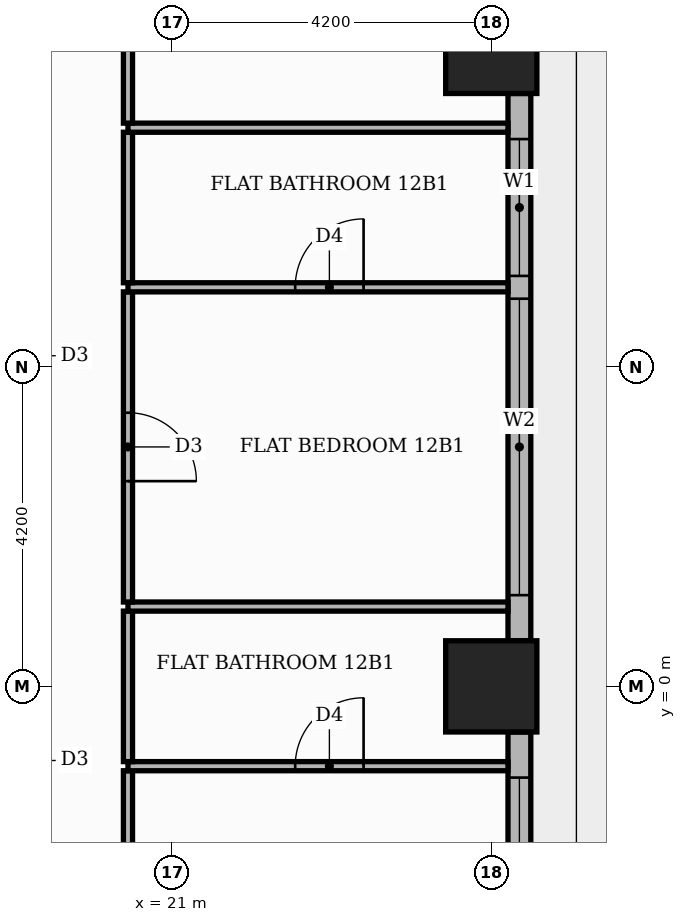
"""IFC4 building model, lengths in metres.
Left out: names, types, materials, properties, quantities, classifications, styles, units other than length and angle.
Written with IfcOpenShell. Run it as: python <this file> out.ifc"""

import sys

from ifc_helpers import new_model, si_unit, direction, frame, frame_2d, origin, origin_2d, place, context, subcontext, project, spatial, rectangle, extrude, element, fill, save


model = new_model("IFC4")
c1 = context("Model", 3, precision=1e-05, world=origin(), true_north=direction((0.0, 1.0)))
c2 = subcontext(c1, "Body", "Model", "MODEL_VIEW")
j1 = project(units=[si_unit("LENGTHUNIT", "METRE"), si_unit("PLANEANGLEUNIT", "RADIAN")], contexts=[c1])
p1 = place(None, origin())
s1 = spatial("IfcSite", under=j1, at=p1, CompositionType="ELEMENT")
p2 = place(p1, origin())
s2 = spatial("IfcBuilding", under=s1, at=p2, CompositionType="ELEMENT")
p3 = place(p2, frame((0.0, 0.0, 54.3)))
s3 = spatial("IfcBuildingStorey", under=s2, at=p3, CompositionType="ELEMENT", Elevation=54.3)
for number, where, z_axis, x_axis in (
    (1, (25.2, 0.0, 0.0), (0.0, 0.0, 1.0), (1.0, 0.0, 0.0)),
    (2, (25.2, 8.4, 0.0), (0.0, 0.0, 1.0), (1.0, 0.0, 0.0)),
):
    element("IfcColumn", number, at=place(p3, frame(where, z_axis=z_axis, x_axis=x_axis)), inside=s3, PredefinedType="COLUMN", context=c2, shape_type="SweptSolid", body=[
        extrude(rectangle(XDim=1.2, YDim=1.2, at=origin_2d()), origin(), (0.0, 0.0, 1.0), 3.9),
    ])
p4 = place(p3, frame((25.57, -7.8, 0.0), z_axis=(0.0, 0.0, 1.0), x_axis=(0.0, 1.0, 0.0)))
e3 = element("IfcWall", 3, at=p4, inside=s3, PredefinedType="STANDARD", context=c2, shape_type="SweptSolid", body=[
    extrude(rectangle(XDim=7.2, YDim=0.3, at=frame_2d((3.6, 0.0))), origin(), (0.0, 0.0, 1.0), 3.48),
])
p5 = place(p4, frame((0.6, 0.0, 0.9)))
e4 = element("IfcOpeningElement", 4, at=p5, cuts=e3, PredefinedType="OPENING", context=c2, shape_type="SweptSolid", body=[
    extrude(rectangle(XDim=1.8, YDim=2.1, at=frame_2d((0.9, 1.05))), frame((0.0, 0.16, 0.0), z_axis=(0.0, -1.0, 0.0), x_axis=(1.0, 0.0, 0.0)), (0.0, 0.0, 1.0), 0.32),
])
p6 = place(p4, frame((2.7, 0.0, 0.9)))
e5 = element("IfcOpeningElement", 5, at=p6, cuts=e3, PredefinedType="OPENING", context=c2, shape_type="SweptSolid", body=[
    extrude(rectangle(XDim=3.9, YDim=2.1, at=frame_2d((1.95, 1.05))), frame((0.0, 0.16, 0.0), z_axis=(0.0, -1.0, 0.0), x_axis=(1.0, 0.0, 0.0)), (0.0, 0.0, 1.0), 0.32),
])
p7 = place(p3, frame((25.57, 0.6, 0.0), z_axis=(0.0, 0.0, 1.0), x_axis=(0.0, 1.0, 0.0)))
e6 = element("IfcWall", 6, at=p7, inside=s3, PredefinedType="STANDARD", context=c2, shape_type="SweptSolid", body=[
    extrude(rectangle(XDim=7.2, YDim=0.3, at=frame_2d((3.6, 0.0))), origin(), (0.0, 0.0, 1.0), 3.48),
])
p8 = place(p7, frame((0.6, 0.0, 0.9)))
e7 = element("IfcOpeningElement", 7, at=p8, cuts=e6, PredefinedType="OPENING", context=c2, shape_type="SweptSolid", body=[
    extrude(rectangle(XDim=3.9, YDim=2.1, at=frame_2d((1.95, 1.05))), frame((0.0, 0.16, 0.0), z_axis=(0.0, -1.0, 0.0), x_axis=(1.0, 0.0, 0.0)), (0.0, 0.0, 1.0), 0.32),
])
p9 = place(p7, frame((4.8, 0.0, 0.9)))
e8 = element("IfcOpeningElement", 8, at=p9, cuts=e6, PredefinedType="OPENING", context=c2, shape_type="SweptSolid", body=[
    extrude(rectangle(XDim=1.8, YDim=2.1, at=frame_2d((0.9, 1.05))), frame((0.0, 0.16, 0.0), z_axis=(0.0, -1.0, 0.0), x_axis=(1.0, 0.0, 0.0)), (0.0, 0.0, 1.0), 0.32),
])
p10 = place(p3, frame((20.42, -5.19, 0.0), z_axis=(0.0, 0.0, 1.0), x_axis=(0.0, 1.0, 0.0)))
e9 = element("IfcWall", 9, at=p10, inside=s3, PredefinedType="PARTITIONING", context=c2, shape_type="SweptSolid", body=[
    extrude(rectangle(XDim=4.08, YDim=0.12, at=frame_2d((2.04, 0.0))), origin(), (0.0, 0.0, 1.0), 3.48),
])
p11 = place(p10, frame((1.59, 0.0, 0.0)))
e10 = element("IfcOpeningElement", 10, at=p11, cuts=e9, PredefinedType="OPENING", context=c2, shape_type="SweptSolid", body=[
    extrude(rectangle(XDim=0.9, YDim=2.1, at=frame_2d((0.45, 1.05))), frame((0.0, 0.07, 0.0), z_axis=(0.0, -1.0, 0.0), x_axis=(1.0, 0.0, 0.0)), (0.0, 0.0, 1.0), 0.14),
])
p12 = place(p3, frame((20.42, -1.05, 0.0), z_axis=(0.0, 0.0, 1.0), x_axis=(1.0, 0.0, 0.0)))
e11 = element("IfcWall", 11, at=p12, inside=s3, PredefinedType="PARTITIONING", context=c2, shape_type="SweptSolid", body=[
    extrude(rectangle(XDim=5.0, YDim=0.12, at=frame_2d((2.5, 0.0))), origin(), (0.0, 0.0, 1.0), 3.48),
])
p13 = place(p12, frame((2.2, 0.0, 0.0)))
e12 = element("IfcOpeningElement", 12, at=p13, cuts=e11, PredefinedType="OPENING", context=c2, shape_type="SweptSolid", body=[
    extrude(rectangle(XDim=0.9, YDim=2.1, at=frame_2d((0.45, 1.05))), frame((0.0, 0.07, 0.0), z_axis=(0.0, -1.0, 0.0), x_axis=(1.0, 0.0, 0.0)), (0.0, 0.0, 1.0), 0.14),
])
p14 = place(p3, frame((20.42, -0.99, 0.0), z_axis=(0.0, 0.0, 1.0), x_axis=(0.0, 1.0, 0.0)))
e13 = element("IfcWall", 13, at=p14, inside=s3, PredefinedType="PARTITIONING", context=c2, shape_type="SweptSolid", body=[
    extrude(rectangle(XDim=1.98, YDim=0.12, at=frame_2d((0.99, 0.0))), origin(), (0.0, 0.0, 1.0), 3.48),
])
p15 = place(p3, frame((20.42, 1.05, 0.0), z_axis=(0.0, 0.0, 1.0), x_axis=(1.0, 0.0, 0.0)))
e14 = element("IfcWall", 14, at=p15, inside=s3, PredefinedType="PARTITIONING", context=c2, shape_type="SweptSolid", body=[
    extrude(rectangle(XDim=5.0, YDim=0.12, at=frame_2d((2.5, 0.0))), origin(), (0.0, 0.0, 1.0), 3.48),
])
p16 = place(p3, frame((20.42, 1.11, 0.0), z_axis=(0.0, 0.0, 1.0), x_axis=(0.0, 1.0, 0.0)))
e15 = element("IfcWall", 15, at=p16, inside=s3, PredefinedType="PARTITIONING", context=c2, shape_type="SweptSolid", body=[
    extrude(rectangle(XDim=4.08, YDim=0.12, at=frame_2d((2.04, 0.0))), origin(), (0.0, 0.0, 1.0), 3.48),
])
p17 = place(p16, frame((1.59, 0.0, 0.0)))
e16 = element("IfcOpeningElement", 16, at=p17, cuts=e15, PredefinedType="OPENING", context=c2, shape_type="SweptSolid", body=[
    extrude(rectangle(XDim=0.9, YDim=2.1, at=frame_2d((0.45, 1.05))), frame((0.0, 0.07, 0.0), z_axis=(0.0, -1.0, 0.0), x_axis=(1.0, 0.0, 0.0)), (0.0, 0.0, 1.0), 0.14),
])
p18 = place(p3, frame((20.42, 5.25, 0.0), z_axis=(0.0, 0.0, 1.0), x_axis=(1.0, 0.0, 0.0)))
e17 = element("IfcWall", 17, at=p18, inside=s3, PredefinedType="PARTITIONING", context=c2, shape_type="SweptSolid", body=[
    extrude(rectangle(XDim=5.0, YDim=0.12, at=frame_2d((2.5, 0.0))), origin(), (0.0, 0.0, 1.0), 3.48),
])
p19 = place(p18, frame((2.2, 0.0, 0.0)))
e18 = element("IfcOpeningElement", 18, at=p19, cuts=e17, PredefinedType="OPENING", context=c2, shape_type="SweptSolid", body=[
    extrude(rectangle(XDim=0.9, YDim=2.1, at=frame_2d((0.45, 1.05))), frame((0.0, 0.07, 0.0), z_axis=(0.0, -1.0, 0.0), x_axis=(1.0, 0.0, 0.0)), (0.0, 0.0, 1.0), 0.14),
])
p20 = place(p3, frame((20.42, 5.31, 0.0), z_axis=(0.0, 0.0, 1.0), x_axis=(0.0, 1.0, 0.0)))
e19 = element("IfcWall", 19, at=p20, inside=s3, PredefinedType="PARTITIONING", context=c2, shape_type="SweptSolid", body=[
    extrude(rectangle(XDim=1.98, YDim=0.12, at=frame_2d((0.99, 0.0))), origin(), (0.0, 0.0, 1.0), 3.48),
])
p21 = place(p3, frame((20.42, 7.35, 0.0), z_axis=(0.0, 0.0, 1.0), x_axis=(1.0, 0.0, 0.0)))
e20 = element("IfcWall", 20, at=p21, inside=s3, PredefinedType="PARTITIONING", context=c2, shape_type="SweptSolid", body=[
    extrude(rectangle(XDim=5.0, YDim=0.12, at=frame_2d((2.5, 0.0))), origin(), (0.0, 0.0, 1.0), 3.48),
])
p22 = place(p3, frame((20.42, 7.41, 0.0), z_axis=(0.0, 0.0, 1.0), x_axis=(0.0, 1.0, 0.0)))
e21 = element("IfcWall", 21, at=p22, inside=s3, PredefinedType="PARTITIONING", context=c2, shape_type="SweptSolid", body=[
    extrude(rectangle(XDim=4.08, YDim=0.12, at=frame_2d((2.04, 0.0))), origin(), (0.0, 0.0, 1.0), 3.48),
])
p23 = place(p22, frame((1.59, 0.0, 0.0)))
e22 = element("IfcOpeningElement", 22, at=p23, cuts=e21, PredefinedType="OPENING", context=c2, shape_type="SweptSolid", body=[
    extrude(rectangle(XDim=0.9, YDim=2.1, at=frame_2d((0.45, 1.05))), frame((0.0, 0.07, 0.0), z_axis=(0.0, -1.0, 0.0), x_axis=(1.0, 0.0, 0.0)), (0.0, 0.0, 1.0), 0.14),
])
p24 = place(p6, origin())
e23 = element("IfcWindow", 23, at=p24, inside=s3, PartitioningType="SINGLE_PANEL", PredefinedType="WINDOW", context=c2, shape_type="SweptSolid", body=[
    extrude(rectangle(XDim=3.9, YDim=2.1, at=frame_2d((1.95, 1.05))), frame((0.0, 0.03, 0.0), z_axis=(0.0, -1.0, 0.0), x_axis=(1.0, 0.0, 0.0)), (0.0, 0.0, 1.0), 0.06),
])
fill(e5, e23)
p25 = place(p8, origin())
e24 = element("IfcWindow", 24, at=p25, inside=s3, PartitioningType="SINGLE_PANEL", PredefinedType="WINDOW", context=c2, shape_type="SweptSolid", body=[
    extrude(rectangle(XDim=3.9, YDim=2.1, at=frame_2d((1.95, 1.05))), frame((0.0, 0.03, 0.0), z_axis=(0.0, -1.0, 0.0), x_axis=(1.0, 0.0, 0.0)), (0.0, 0.0, 1.0), 0.06),
])
fill(e7, e24)
p26 = place(p9, origin())
e25 = element("IfcWindow", 25, at=p26, inside=s3, PartitioningType="SINGLE_PANEL", PredefinedType="WINDOW", context=c2, shape_type="SweptSolid", body=[
    extrude(rectangle(XDim=1.8, YDim=2.1, at=frame_2d((0.9, 1.05))), frame((0.0, 0.03, 0.0), z_axis=(0.0, -1.0, 0.0), x_axis=(1.0, 0.0, 0.0)), (0.0, 0.0, 1.0), 0.06),
])
fill(e8, e25)
p27 = place(p13, origin())
e26 = element("IfcDoor", 26, at=p27, inside=s3, OperationType="SINGLE_SWING_RIGHT", PredefinedType="DOOR", context=c2, shape_type="SweptSolid", body=[
    extrude(rectangle(XDim=0.9, YDim=2.1, at=frame_2d((0.45, 1.05))), frame((0.0, 0.025, 0.0), z_axis=(0.0, -1.0, 0.0), x_axis=(1.0, 0.0, 0.0)), (0.0, 0.0, 1.0), 0.05),
])
fill(e12, e26)
p28 = place(p17, frame((0.9, 0.0, 0.0), z_axis=(0.0, 0.0, 1.0), x_axis=(-1.0, 0.0, 0.0)))
e27 = element("IfcDoor", 27, at=p28, inside=s3, OperationType="SINGLE_SWING_LEFT", PredefinedType="DOOR", context=c2, shape_type="SweptSolid", body=[
    extrude(rectangle(XDim=0.9, YDim=2.1, at=frame_2d((0.45, 1.05))), frame((0.0, 0.025, 0.0), z_axis=(0.0, -1.0, 0.0), x_axis=(1.0, 0.0, 0.0)), (0.0, 0.0, 1.0), 0.05),
])
fill(e16, e27)
p29 = place(p19, origin())
e28 = element("IfcDoor", 28, at=p29, inside=s3, OperationType="SINGLE_SWING_RIGHT", PredefinedType="DOOR", context=c2, shape_type="SweptSolid", body=[
    extrude(rectangle(XDim=0.9, YDim=2.1, at=frame_2d((0.45, 1.05))), frame((0.0, 0.025, 0.0), z_axis=(0.0, -1.0, 0.0), x_axis=(1.0, 0.0, 0.0)), (0.0, 0.0, 1.0), 0.05),
])
fill(e18, e28)
save(model, sys.argv[1])
